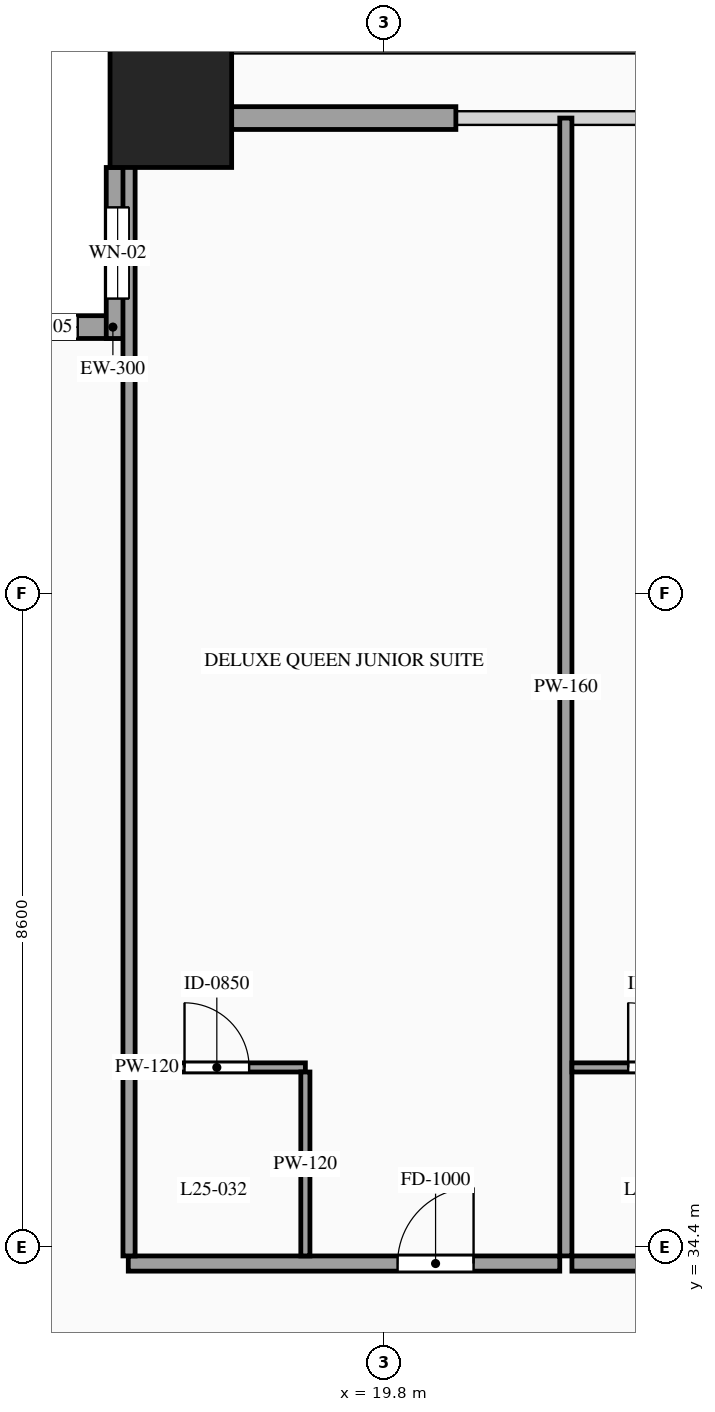
"""IFC4 building model, lengths in metres.
Left out: names, types, materials, properties, quantities, classifications, styles, units other than length and angle.
Written with IfcOpenShell. Run it as: python <this file> out.ifc"""

import sys

from ifc_helpers import new_model, si_unit, direction, frame, frame_2d, origin, origin_2d, place, context, subcontext, project, spatial, rectangle, hollow_rectangle, extrude, source, transform, mapped, element, fill, save


model = new_model("IFC4")
c1 = context("Model", 3, precision=1e-05, world=origin(), true_north=direction((0.0, 1.0)))
c2 = subcontext(c1, "Body", "Model", "MODEL_VIEW")
j1 = project(units=[si_unit("LENGTHUNIT", "METRE"), si_unit("PLANEANGLEUNIT", "RADIAN")], contexts=[c1])
p1 = place(None, origin())
s1 = spatial("IfcSite", under=j1, at=p1, CompositionType="ELEMENT")
p2 = place(p1, origin())
s2 = spatial("IfcBuilding", under=s1, at=p2, CompositionType="ELEMENT")
p3 = place(p2, frame((0.0, 0.0, 97.4)))
s3 = spatial("IfcBuildingStorey", under=s2, at=p3, CompositionType="ELEMENT", Elevation=97.4)
m1 = source(origin(), c2, "Body", "SweptSolid", [
    extrude(hollow_rectangle(XDim=1.6, YDim=1.6, WallThickness=0.07, at=origin_2d()), origin(), (0.0, 0.0, 1.0), 3.6),
])
p4 = place(p3, frame((17.0, 49.4, 0.0), z_axis=(0.0, 0.0, 1.0), x_axis=(1.0, 0.0, 0.0)))
e1 = element("IfcColumn", 1, at=p4, inside=s3, PredefinedType="COLUMN", context=c2, shape_type="MappedRepresentation", body=[
    mapped(m1, transform((0.0, 0.0, 0.0), scale=1.0)),
])
p5 = place(p3, frame((16.45, 46.5, 0.0), z_axis=(0.0, 0.0, 1.0), x_axis=(-1.0, 0.0, 0.0)))
e2 = element("IfcWall", 2, at=p5, inside=s3, PredefinedType="SOLIDWALL", context=c2, shape_type="SweptSolid", body=[
    extrude(rectangle(XDim=2.25, YDim=0.3, at=frame_2d((1.125, 0.0))), origin(), (0.0, 0.0, 1.0), 3.38),
])
p6 = place(p5, frame((0.675, 0.0, 0.85)))
e3 = element("IfcOpeningElement", 3, at=p6, cuts=e2, PredefinedType="OPENING", context=c2, shape_type="SweptSolid", body=[
    extrude(rectangle(XDim=0.9, YDim=1.5, at=frame_2d((0.45, 0.75))), frame((0.0, 0.165, 0.0), z_axis=(0.0, -1.0, 0.0), x_axis=(1.0, 0.0, 0.0)), (0.0, 0.0, 1.0), 0.33),
])
p7 = place(p3, frame((16.3, 48.6, 0.0), z_axis=(0.0, 0.0, 1.0), x_axis=(0.0, -1.0, 0.0)))
e4 = element("IfcWall", 4, at=p7, inside=s3, PredefinedType="SOLIDWALL", context=c2, shape_type="SweptSolid", body=[
    extrude(rectangle(XDim=2.25, YDim=0.3, at=frame_2d((1.125, 0.0))), origin(), (0.0, 0.0, 1.0), 3.38),
])
p8 = place(p7, frame((0.525, 0.0, 0.85)))
e5 = element("IfcOpeningElement", 5, at=p8, cuts=e4, PredefinedType="OPENING", context=c2, shape_type="SweptSolid", body=[
    extrude(rectangle(XDim=1.2, YDim=2.1, at=frame_2d((0.6, 1.05))), frame((0.0, 0.165, 0.0), z_axis=(0.0, -1.0, 0.0), x_axis=(1.0, 0.0, 0.0)), (0.0, 0.0, 1.0), 0.33),
])
m2 = source(origin(), c2, "Body", "SweptSolid", [
    extrude(rectangle(XDim=2.95, YDim=0.3, at=frame_2d((1.475, 0.0))), origin(), (0.0, 0.0, 1.0), 2.775),
])
p9 = place(p3, frame((17.8, 49.25, 0.0), z_axis=(0.0, 0.0, 1.0), x_axis=(1.0, 0.0, 0.0)))
e6 = element("IfcWall", 6, at=p9, inside=s3, PredefinedType="SOLIDWALL", context=c2, shape_type="MappedRepresentation", body=[
    mapped(m2, transform((0.0, 0.0, 0.0), scale=1.0)),
])
p10 = place(p3, frame((16.44, 34.18, 0.0), z_axis=(0.0, 0.0, 1.0), x_axis=(1.0, 0.0, 0.0)))
e7 = element("IfcWall", 7, at=p10, inside=s3, PredefinedType="PARTITIONING", context=c2, shape_type="SweptSolid", body=[
    extrude(rectangle(XDim=5.677, YDim=0.2, at=frame_2d((2.838, 0.0))), origin(), (0.0, 0.0, 1.0), 3.38),
])
p11 = place(p10, frame((3.543, 0.0, 0.0)))
e8 = element("IfcOpeningElement", 8, at=p11, cuts=e7, PredefinedType="OPENING", context=c2, shape_type="SweptSolid", body=[
    extrude(rectangle(XDim=1.0, YDim=2.2, at=frame_2d((0.5, 1.1))), frame((0.0, 0.115, 0.0), z_axis=(0.0, -1.0, 0.0), x_axis=(1.0, 0.0, 0.0)), (0.0, 0.0, 1.0), 0.23),
])
m3 = source(origin(), c2, "Body", "SweptSolid", [
    extrude(rectangle(XDim=14.97, YDim=0.16, at=frame_2d((7.485, 0.0))), origin(), (0.0, 0.0, 1.0), 3.38),
])
p12 = place(p3, frame((22.197, 34.28, 0.0), z_axis=(0.0, 0.0, 1.0), x_axis=(0.0, 1.0, 0.0)))
e9 = element("IfcWall", 9, at=p12, inside=s3, PredefinedType="PARTITIONING", context=c2, shape_type="MappedRepresentation", body=[
    mapped(m3, transform((0.0, 0.0, 0.0), scale=1.0)),
])
p13 = place(p3, frame((16.44, 36.76, 0.0), z_axis=(0.0, 0.0, 1.0), x_axis=(1.0, 0.0, 0.0)))
e10 = element("IfcWall", 10, at=p13, inside=s3, PredefinedType="PARTITIONING", context=c2, shape_type="SweptSolid", body=[
    extrude(rectangle(XDim=2.33, YDim=0.12, at=frame_2d((1.165, 0.0))), origin(), (0.0, 0.0, 1.0), 3.38),
])
p14 = place(p13, frame((0.74, 0.0, 0.0)))
e11 = element("IfcOpeningElement", 11, at=p14, cuts=e10, PredefinedType="OPENING", context=c2, shape_type="SweptSolid", body=[
    extrude(rectangle(XDim=0.85, YDim=2.1, at=frame_2d((0.425, 1.05))), frame((0.0, 0.075, 0.0), z_axis=(0.0, -1.0, 0.0), x_axis=(1.0, 0.0, 0.0)), (0.0, 0.0, 1.0), 0.15),
])
m4 = source(origin(), c2, "Body", "SweptSolid", [
    extrude(rectangle(XDim=2.42, YDim=0.12, at=frame_2d((1.21, 0.0))), origin(), (0.0, 0.0, 1.0), 3.38),
])
p15 = place(p3, frame((18.77, 34.28, 0.0), z_axis=(0.0, 0.0, 1.0), x_axis=(0.0, 1.0, 0.0)))
e12 = element("IfcWall", 12, at=p15, inside=s3, PredefinedType="PARTITIONING", context=c2, shape_type="MappedRepresentation", body=[
    mapped(m4, transform((0.0, 0.0, 0.0), scale=1.0)),
])
p16 = place(p3, frame((22.277, 34.18, 0.0), z_axis=(0.0, 0.0, 1.0), x_axis=(1.0, 0.0, 0.0)))
e13 = element("IfcWall", 13, at=p16, inside=s3, PredefinedType="PARTITIONING", context=c2, shape_type="SweptSolid", body=[
    extrude(rectangle(XDim=6.325, YDim=0.2, at=frame_2d((3.163, 0.0))), origin(), (0.0, 0.0, 1.0), 3.38),
])
p17 = place(p16, frame((3.868, 0.0, 0.0)))
e14 = element("IfcOpeningElement", 14, at=p17, cuts=e13, PredefinedType="OPENING", context=c2, shape_type="SweptSolid", body=[
    extrude(rectangle(XDim=1.0, YDim=2.2, at=frame_2d((0.5, 1.1))), frame((0.0, 0.115, 0.0), z_axis=(0.0, -1.0, 0.0), x_axis=(1.0, 0.0, 0.0)), (0.0, 0.0, 1.0), 0.23),
])
p18 = place(p3, frame((22.277, 36.76, 0.0), z_axis=(0.0, 0.0, 1.0), x_axis=(1.0, 0.0, 0.0)))
e15 = element("IfcWall", 15, at=p18, inside=s3, PredefinedType="PARTITIONING", context=c2, shape_type="SweptSolid", body=[
    extrude(rectangle(XDim=2.33, YDim=0.12, at=frame_2d((1.165, 0.0))), origin(), (0.0, 0.0, 1.0), 3.38),
])
p19 = place(p18, frame((0.74, 0.0, 0.0)))
e16 = element("IfcOpeningElement", 16, at=p19, cuts=e15, PredefinedType="OPENING", context=c2, shape_type="SweptSolid", body=[
    extrude(rectangle(XDim=0.85, YDim=2.1, at=frame_2d((0.425, 1.05))), frame((0.0, 0.075, 0.0), z_axis=(0.0, -1.0, 0.0), x_axis=(1.0, 0.0, 0.0)), (0.0, 0.0, 1.0), 0.15),
])
m5 = source(origin(), c2, "Body", "SweptSolid", [
    extrude(rectangle(XDim=14.82, YDim=0.16, at=frame_2d((7.41, 0.0))), origin(), (0.0, 0.0, 1.0), 3.38),
])
p20 = place(p3, frame((16.45, 34.28, 0.0), z_axis=(0.0, 0.0, 1.0), x_axis=(0.0, 1.0, 0.0)))
e17 = element("IfcWall", 17, at=p20, inside=s3, PredefinedType="PARTITIONING", context=c2, shape_type="MappedRepresentation", body=[
    mapped(m5, transform((0.0, 0.0, 0.0), scale=1.0)),
])
m6 = source(origin(), c2, "Body", "SweptSolid", [
    extrude(rectangle(XDim=0.9, YDim=1.5, at=frame_2d((0.45, 0.75))), frame((0.0, 0.03, 0.0), z_axis=(0.0, -1.0, 0.0), x_axis=(1.0, 0.0, 0.0)), (0.0, 0.0, 1.0), 0.06),
])
p21 = place(p6, origin())
e18 = element("IfcWindow", 18, at=p21, inside=s3, PartitioningType="SINGLE_PANEL", PredefinedType="WINDOW", context=c2, shape_type="MappedRepresentation", body=[
    mapped(m6, transform((0.0, 0.0, 0.0), scale=1.0)),
])
fill(e3, e18)
m7 = source(origin(), c2, "Body", "SweptSolid", [
    extrude(rectangle(XDim=1.2, YDim=2.1, at=frame_2d((0.6, 1.05))), frame((0.0, 0.03, 0.0), z_axis=(0.0, -1.0, 0.0), x_axis=(1.0, 0.0, 0.0)), (0.0, 0.0, 1.0), 0.06),
])
p22 = place(p8, origin())
e19 = element("IfcWindow", 19, at=p22, inside=s3, PartitioningType="SINGLE_PANEL", PredefinedType="WINDOW", context=c2, shape_type="MappedRepresentation", body=[
    mapped(m7, transform((0.0, 0.0, 0.0), scale=1.0)),
])
fill(e5, e19)
m8 = source(origin(), c2, "Body", "SweptSolid", [
    extrude(rectangle(XDim=1.0, YDim=2.2, at=frame_2d((0.5, 1.1))), frame((0.0, 0.025, 0.0), z_axis=(0.0, -1.0, 0.0), x_axis=(1.0, 0.0, 0.0)), (0.0, 0.0, 1.0), 0.05),
])
p23 = place(p11, origin())
e20 = element("IfcDoor", 20, at=p23, inside=s3, OperationType="SINGLE_SWING_RIGHT", PredefinedType="DOOR", context=c2, shape_type="MappedRepresentation", body=[
    mapped(m8, transform((0.0, 0.0, 0.0), scale=1.0)),
])
fill(e8, e20)
m9 = source(origin(), c2, "Body", "SweptSolid", [
    extrude(rectangle(XDim=0.85, YDim=2.1, at=frame_2d((0.425, 1.05))), frame((0.0, 0.025, 0.0), z_axis=(0.0, -1.0, 0.0), x_axis=(1.0, 0.0, 0.0)), (0.0, 0.0, 1.0), 0.05),
])
p24 = place(p14, origin())
e21 = element("IfcDoor", 21, at=p24, inside=s3, OperationType="SINGLE_SWING_LEFT", PredefinedType="DOOR", context=c2, shape_type="MappedRepresentation", body=[
    mapped(m9, transform((0.0, 0.0, 0.0), scale=1.0)),
])
fill(e11, e21)
p25 = place(p19, origin())
e22 = element("IfcDoor", 22, at=p25, inside=s3, OperationType="SINGLE_SWING_LEFT", PredefinedType="DOOR", context=c2, shape_type="MappedRepresentation", body=[
    mapped(m9, transform((0.0, 0.0, 0.0), scale=1.0)),
])
fill(e16, e22)
save(model, sys.argv[1])
